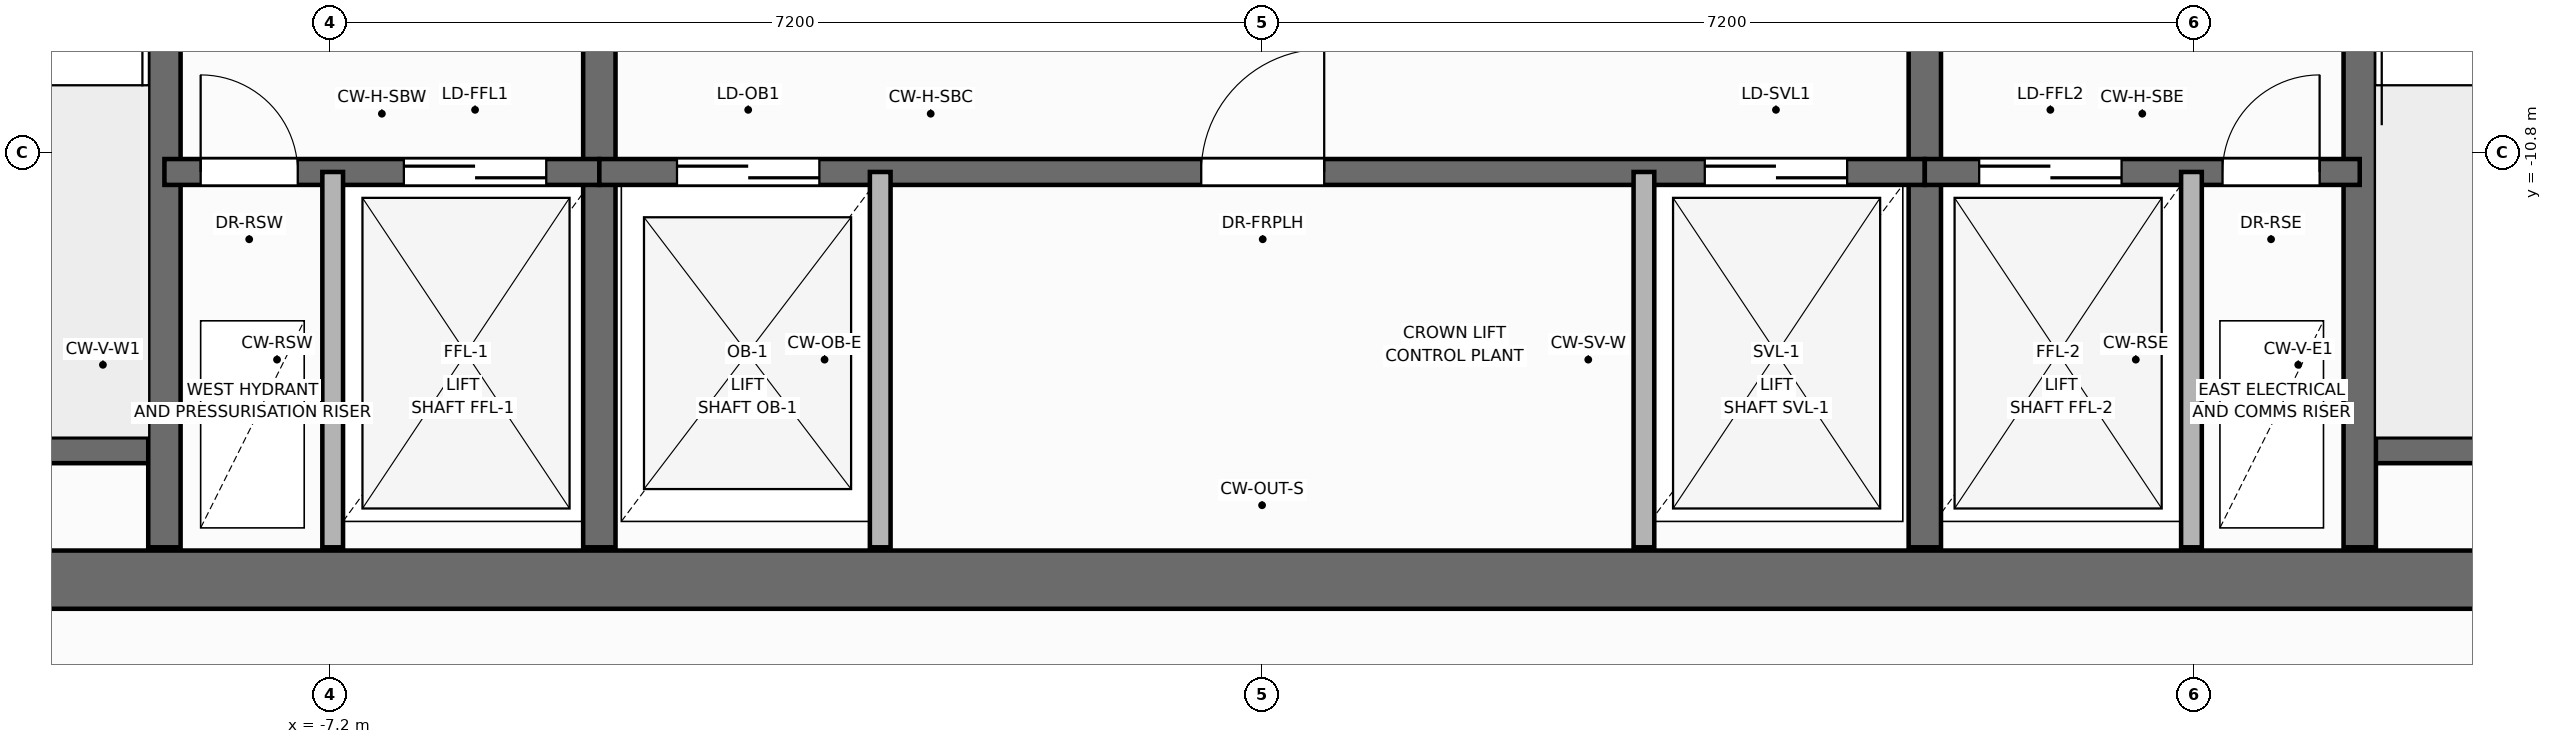
"""IFC4 building model, lengths in metres.
Left out: names, types, materials, properties, quantities, classifications, styles, units other than length and angle.
Written with IfcOpenShell. Run it as: python <this file> out.ifc"""

import sys

from ifc_helpers import new_model, si_unit, direction, frame, frame_2d, origin, place, context, subcontext, project, spatial, rectangle, extrude, element, fill, save


model = new_model("IFC4")
c1 = context("Model", 3, precision=1e-05, world=origin(), true_north=direction((0.0, 1.0)))
c2 = subcontext(c1, "Body", "Model", "MODEL_VIEW")
j1 = project(units=[si_unit("LENGTHUNIT", "METRE"), si_unit("PLANEANGLEUNIT", "RADIAN")], contexts=[c1])
p1 = place(None, origin())
s1 = spatial("IfcSite", under=j1, at=p1, CompositionType="ELEMENT")
p2 = place(p1, origin())
s2 = spatial("IfcBuilding", under=s1, at=p2, CompositionType="ELEMENT")
p3 = place(p2, frame((0.0, 0.0, 293.4)))
s3 = spatial("IfcBuildingStorey", under=s2, at=p3, CompositionType="ELEMENT", Elevation=293.4)
p4 = place(p3, frame((-12.65, -14.1, 0.0), z_axis=(0.0, 0.0, 1.0), x_axis=(1.0, 0.0, 0.0)))
e1 = element("IfcWall", 1, at=p4, inside=s3, PredefinedType="SHEAR", context=c2, shape_type="SweptSolid", body=[
    extrude(rectangle(XDim=25.3, YDim=0.45, at=frame_2d((12.65, 0.0))), origin(), (0.0, 0.0, 1.0), 4.2),
])
for number, where, z_axis, x_axis in (
    (2, (-12.35, -13.1, 0.0), (0.0, 0.0, 1.0), (1.0, 0.0, 0.0)),
    (3, (8.48, -13.1, 0.0), (0.0, 0.0, 1.0), (1.0, 0.0, 0.0)),
):
    element("IfcWall", number, at=place(p3, frame(where, z_axis=z_axis, x_axis=x_axis)), inside=s3, PredefinedType="SOLIDWALL", context=c2, shape_type="SweptSolid", body=[
        extrude(rectangle(XDim=3.87, YDim=0.2, at=frame_2d((1.935, 0.0))), origin(), (0.0, 0.0, 1.0), 4.2),
    ])
p5 = place(p3, frame((-8.48, -13.85, 0.0), z_axis=(0.0, 0.0, 1.0), x_axis=(0.0, 1.0, 0.0)))
e4 = element("IfcWall", 4, at=p5, inside=s3, PredefinedType="SHEAR", context=c2, shape_type="SweptSolid", body=[
    extrude(rectangle(XDim=9.4, YDim=0.25, at=frame_2d((4.7, 0.0))), origin(), (0.0, 0.0, 1.0), 4.2),
])
p6 = place(p5, frame((6.95, 0.0, 0.0)))
e5 = element("IfcOpeningElement", 5, at=p6, cuts=e4, PredefinedType="OPENING", context=c2, shape_type="SweptSolid", body=[
    extrude(rectangle(XDim=1.006, YDim=2.104, at=frame_2d((0.5, 1.052))), frame((0.0, 0.135, 0.0), z_axis=(0.0, -1.0, 0.0), x_axis=(1.0, 0.0, 0.0)), (0.0, 0.0, 1.0), 0.27),
])
p7 = place(p3, frame((8.48, -13.85, 0.0), z_axis=(0.0, 0.0, 1.0), x_axis=(0.0, 1.0, 0.0)))
e6 = element("IfcWall", 6, at=p7, inside=s3, PredefinedType="SHEAR", context=c2, shape_type="SweptSolid", body=[
    extrude(rectangle(XDim=9.4, YDim=0.25, at=frame_2d((4.7, 0.0))), origin(), (0.0, 0.0, 1.0), 4.2),
])
p8 = place(p7, frame((6.95, 0.0, 0.0)))
e7 = element("IfcOpeningElement", 7, at=p8, cuts=e6, PredefinedType="OPENING", context=c2, shape_type="SweptSolid", body=[
    extrude(rectangle(XDim=1.006, YDim=2.104, at=frame_2d((0.5, 1.052))), frame((0.0, 0.135, 0.0), z_axis=(0.0, -1.0, 0.0), x_axis=(1.0, 0.0, 0.0)), (0.0, 0.0, 1.0), 0.27),
])
for number, where, z_axis, x_axis in (
    (8, (-5.12, -13.85, 0.0), (0.0, 0.0, 1.0), (0.0, 1.0, 0.0)),
    (9, (5.12, -13.85, 0.0), (0.0, 0.0, 1.0), (0.0, 1.0, 0.0)),
):
    element("IfcWall", number, at=place(p3, frame(where, z_axis=z_axis, x_axis=x_axis)), inside=s3, PredefinedType="SHEAR", context=c2, shape_type="SweptSolid", body=[
        extrude(rectangle(XDim=9.4, YDim=0.25, at=frame_2d((4.7, 0.0))), origin(), (0.0, 0.0, 1.0), 4.2),
    ])
p9 = place(p3, frame((-8.48, -10.95, 0.0), z_axis=(0.0, 0.0, 1.0), x_axis=(1.0, 0.0, 0.0)))
e10 = element("IfcWall", 10, at=p9, inside=s3, PredefinedType="SOLIDWALL", context=c2, shape_type="SweptSolid", body=[
    extrude(rectangle(XDim=3.36, YDim=0.2, at=frame_2d((1.68, 0.0))), origin(), (0.0, 0.0, 1.0), 4.2),
])
p10 = place(p9, frame((0.28, 0.0, 0.0)))
e11 = element("IfcOpeningElement", 11, at=p10, cuts=e10, PredefinedType="OPENING", context=c2, shape_type="SweptSolid", body=[
    extrude(rectangle(XDim=0.756, YDim=2.054, at=frame_2d((0.375, 1.027))), frame((0.0, 0.11, 0.0), z_axis=(0.0, -1.0, 0.0), x_axis=(1.0, 0.0, 0.0)), (0.0, 0.0, 1.0), 0.22),
])
p11 = place(p9, frame((1.85, 0.0, 0.0)))
e12 = element("IfcOpeningElement", 12, at=p11, cuts=e10, PredefinedType="OPENING", context=c2, shape_type="SweptSolid", body=[
    extrude(rectangle(XDim=1.106, YDim=2.104, at=frame_2d((0.55, 1.052))), frame((0.0, 0.11, 0.0), z_axis=(0.0, -1.0, 0.0), x_axis=(1.0, 0.0, 0.0)), (0.0, 0.0, 1.0), 0.22),
])
p12 = place(p3, frame((-5.12, -10.95, 0.0), z_axis=(0.0, 0.0, 1.0), x_axis=(1.0, 0.0, 0.0)))
e13 = element("IfcWall", 13, at=p12, inside=s3, PredefinedType="SOLIDWALL", context=c2, shape_type="SweptSolid", body=[
    extrude(rectangle(XDim=10.24, YDim=0.2, at=frame_2d((5.12, 0.0))), origin(), (0.0, 0.0, 1.0), 4.2),
])
p13 = place(p12, frame((0.6, 0.0, 0.0)))
e14 = element("IfcOpeningElement", 14, at=p13, cuts=e13, PredefinedType="OPENING", context=c2, shape_type="SweptSolid", body=[
    extrude(rectangle(XDim=1.106, YDim=2.104, at=frame_2d((0.55, 1.052))), frame((0.0, 0.11, 0.0), z_axis=(0.0, -1.0, 0.0), x_axis=(1.0, 0.0, 0.0)), (0.0, 0.0, 1.0), 0.22),
])
p14 = place(p12, frame((4.65, 0.0, 0.0)))
e15 = element("IfcOpeningElement", 15, at=p14, cuts=e13, PredefinedType="OPENING", context=c2, shape_type="SweptSolid", body=[
    extrude(rectangle(XDim=0.956, YDim=2.104, at=frame_2d((0.475, 1.052))), frame((0.0, 0.11, 0.0), z_axis=(0.0, -1.0, 0.0), x_axis=(1.0, 0.0, 0.0)), (0.0, 0.0, 1.0), 0.22),
])
p15 = place(p12, frame((8.54, 0.0, 0.0)))
e16 = element("IfcOpeningElement", 16, at=p15, cuts=e13, PredefinedType="OPENING", context=c2, shape_type="SweptSolid", body=[
    extrude(rectangle(XDim=1.106, YDim=2.104, at=frame_2d((0.55, 1.052))), frame((0.0, 0.11, 0.0), z_axis=(0.0, -1.0, 0.0), x_axis=(1.0, 0.0, 0.0)), (0.0, 0.0, 1.0), 0.22),
])
p16 = place(p3, frame((5.12, -10.95, 0.0), z_axis=(0.0, 0.0, 1.0), x_axis=(1.0, 0.0, 0.0)))
e17 = element("IfcWall", 17, at=p16, inside=s3, PredefinedType="SOLIDWALL", context=c2, shape_type="SweptSolid", body=[
    extrude(rectangle(XDim=3.36, YDim=0.2, at=frame_2d((1.68, 0.0))), origin(), (0.0, 0.0, 1.0), 4.2),
])
p17 = place(p16, frame((0.42, 0.0, 0.0)))
e18 = element("IfcOpeningElement", 18, at=p17, cuts=e17, PredefinedType="OPENING", context=c2, shape_type="SweptSolid", body=[
    extrude(rectangle(XDim=1.106, YDim=2.104, at=frame_2d((0.55, 1.052))), frame((0.0, 0.11, 0.0), z_axis=(0.0, -1.0, 0.0), x_axis=(1.0, 0.0, 0.0)), (0.0, 0.0, 1.0), 0.22),
])
p18 = place(p16, frame((2.3, 0.0, 0.0)))
e19 = element("IfcOpeningElement", 19, at=p18, cuts=e17, PredefinedType="OPENING", context=c2, shape_type="SweptSolid", body=[
    extrude(rectangle(XDim=0.756, YDim=2.054, at=frame_2d((0.375, 1.027))), frame((0.0, 0.11, 0.0), z_axis=(0.0, -1.0, 0.0), x_axis=(1.0, 0.0, 0.0)), (0.0, 0.0, 1.0), 0.22),
])
for number, where, z_axis, x_axis in (
    (20, (-7.18, -13.85, 0.0), (0.0, 0.0, 1.0), (0.0, 1.0, 0.0)),
    (21, (7.18, -13.85, 0.0), (0.0, 0.0, 1.0), (0.0, 1.0, 0.0)),
    (22, (-2.95, -13.85, 0.0), (0.0, 0.0, 1.0), (0.0, 1.0, 0.0)),
    (23, (2.95, -13.85, 0.0), (0.0, 0.0, 1.0), (0.0, 1.0, 0.0)),
):
    element("IfcWall", number, at=place(p3, frame(where, z_axis=z_axis, x_axis=x_axis)), inside=s3, PredefinedType="PARTITIONING", context=c2, shape_type="SweptSolid", body=[
        extrude(rectangle(XDim=2.9, YDim=0.16, at=frame_2d((1.45, 0.0))), origin(), (0.0, 0.0, 1.0), 3.105),
    ])
p19 = place(p10, origin())
e24 = element("IfcDoor", 24, at=p19, inside=s3, OperationType="SINGLE_SWING_LEFT", PredefinedType="DOOR", context=c2, shape_type="SweptSolid", body=[
    extrude(rectangle(XDim=0.75, YDim=2.05, at=frame_2d((0.375, 1.025))), frame((0.0, 0.025, 0.0), z_axis=(0.0, -1.0, 0.0), x_axis=(1.0, 0.0, 0.0)), (0.0, 0.0, 1.0), 0.05),
])
fill(e11, e24)
p20 = place(p11, origin())
e25 = element("IfcDoor", 25, at=p20, inside=s3, OperationType="DOUBLE_DOOR_SLIDING", PredefinedType="DOOR", context=c2, shape_type="SweptSolid", body=[
    extrude(rectangle(XDim=1.1, YDim=2.1, at=frame_2d((0.55, 1.05))), frame((0.0, 0.025, 0.0), z_axis=(0.0, -1.0, 0.0), x_axis=(1.0, 0.0, 0.0)), (0.0, 0.0, 1.0), 0.05),
])
fill(e12, e25)
p21 = place(p17, origin())
e26 = element("IfcDoor", 26, at=p21, inside=s3, OperationType="DOUBLE_DOOR_SLIDING", PredefinedType="DOOR", context=c2, shape_type="SweptSolid", body=[
    extrude(rectangle(XDim=1.1, YDim=2.1, at=frame_2d((0.55, 1.05))), frame((0.0, 0.025, 0.0), z_axis=(0.0, -1.0, 0.0), x_axis=(1.0, 0.0, 0.0)), (0.0, 0.0, 1.0), 0.05),
])
fill(e18, e26)
p22 = place(p18, origin())
e27 = element("IfcDoor", 27, at=p22, inside=s3, OperationType="SINGLE_SWING_RIGHT", PredefinedType="DOOR", context=c2, shape_type="SweptSolid", body=[
    extrude(rectangle(XDim=0.75, YDim=2.05, at=frame_2d((0.375, 1.025))), frame((0.0, 0.025, 0.0), z_axis=(0.0, -1.0, 0.0), x_axis=(1.0, 0.0, 0.0)), (0.0, 0.0, 1.0), 0.05),
])
fill(e19, e27)
p23 = place(p13, origin())
e28 = element("IfcDoor", 28, at=p23, inside=s3, OperationType="DOUBLE_DOOR_SLIDING", PredefinedType="DOOR", context=c2, shape_type="SweptSolid", body=[
    extrude(rectangle(XDim=1.1, YDim=2.1, at=frame_2d((0.55, 1.05))), frame((0.0, 0.025, 0.0), z_axis=(0.0, -1.0, 0.0), x_axis=(1.0, 0.0, 0.0)), (0.0, 0.0, 1.0), 0.05),
])
fill(e14, e28)
p24 = place(p14, origin())
e29 = element("IfcDoor", 29, at=p24, inside=s3, OperationType="SINGLE_SWING_RIGHT", PredefinedType="DOOR", context=c2, shape_type="SweptSolid", body=[
    extrude(rectangle(XDim=0.95, YDim=2.1, at=frame_2d((0.475, 1.05))), frame((0.0, 0.025, 0.0), z_axis=(0.0, -1.0, 0.0), x_axis=(1.0, 0.0, 0.0)), (0.0, 0.0, 1.0), 0.05),
])
fill(e15, e29)
p25 = place(p15, origin())
e30 = element("IfcDoor", 30, at=p25, inside=s3, OperationType="DOUBLE_DOOR_SLIDING", PredefinedType="DOOR", context=c2, shape_type="SweptSolid", body=[
    extrude(rectangle(XDim=1.1, YDim=2.1, at=frame_2d((0.55, 1.05))), frame((0.0, 0.025, 0.0), z_axis=(0.0, -1.0, 0.0), x_axis=(1.0, 0.0, 0.0)), (0.0, 0.0, 1.0), 0.05),
])
fill(e16, e30)
save(model, sys.argv[1])
